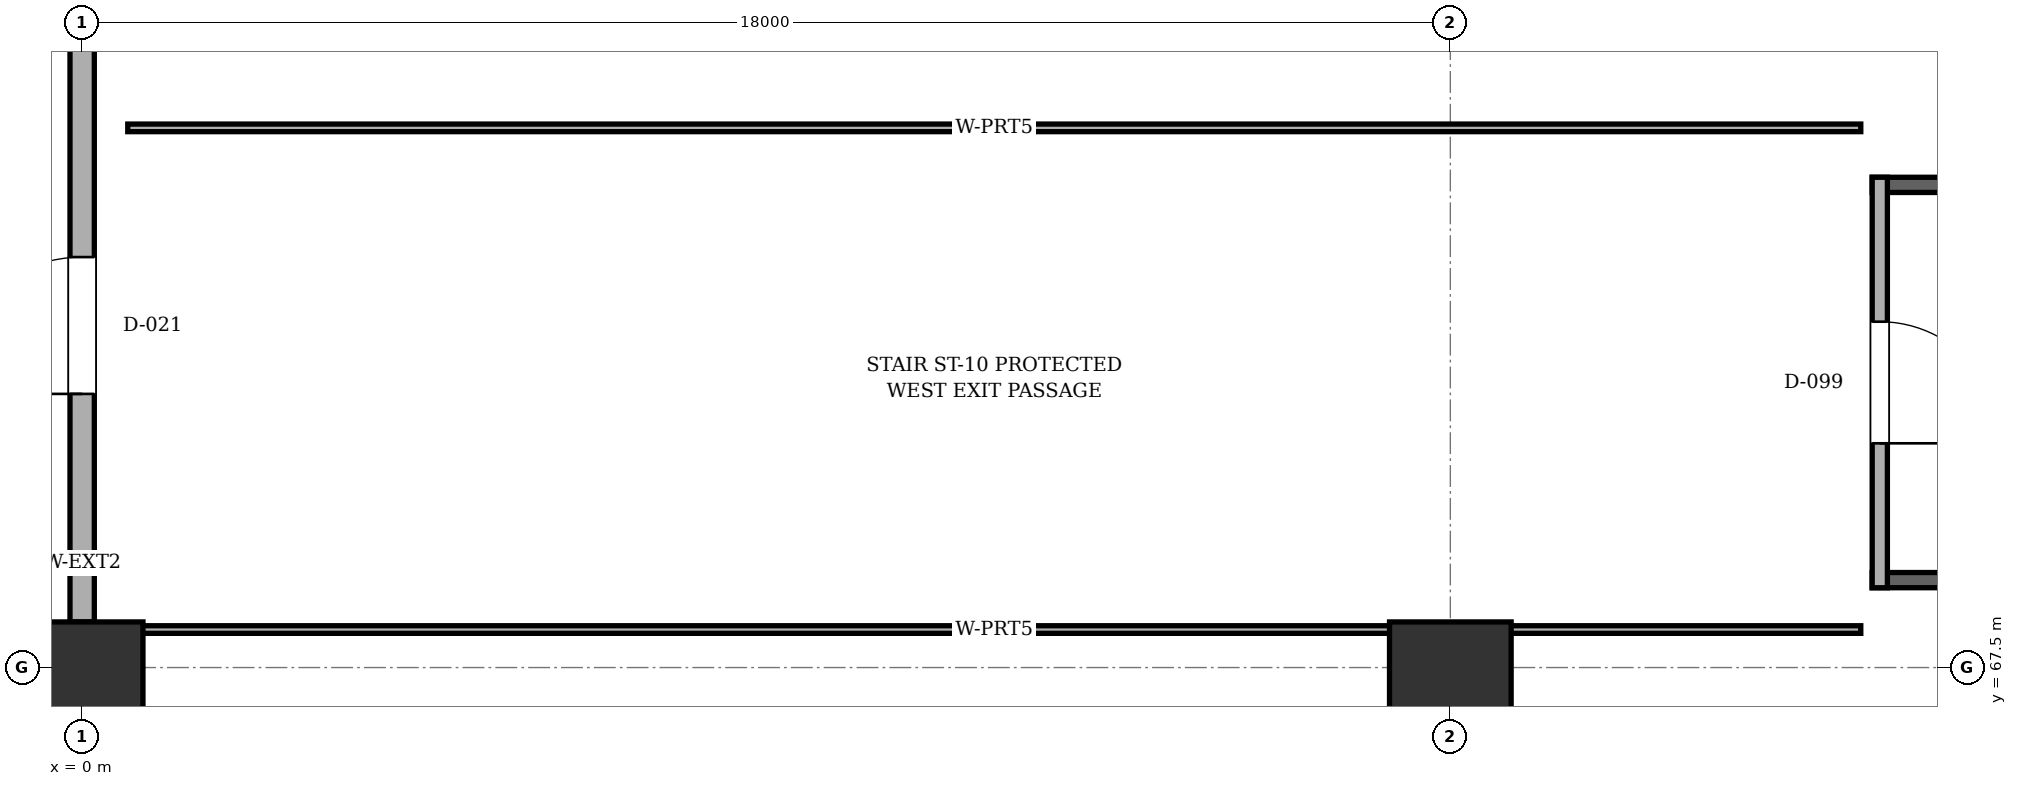
"""IFC4 building model, lengths in metres.
Left out: names, types, materials, properties, quantities, classifications, styles, units other than length and angle.
Written with IfcOpenShell. Run it as: python <this file> out.ifc"""

import sys

from ifc_helpers import new_model, si_unit, direction, frame, frame_2d, origin, origin_2d, place, context, subcontext, project, spatial, rectangle, extrude, element, fill, save


model = new_model("IFC4")
c1 = context("Model", 3, precision=1e-05, world=origin(), true_north=direction((0.0, 1.0)))
c2 = subcontext(c1, "Body", "Model", "MODEL_VIEW")
j1 = project(units=[si_unit("LENGTHUNIT", "METRE"), si_unit("PLANEANGLEUNIT", "RADIAN")], contexts=[c1])
p1 = place(None, origin())
s1 = spatial("IfcSite", under=j1, at=p1, CompositionType="ELEMENT")
p2 = place(p1, origin())
s2 = spatial("IfcBuilding", under=s1, at=p2, CompositionType="ELEMENT")
p3 = place(p2, origin())
s3 = spatial("IfcBuildingStorey", under=s2, at=p3, CompositionType="ELEMENT", Elevation=0.0)
for number, where, z_axis, x_axis in (
    (1, (0.0, 67.5, 0.0), (0.0, 0.0, 1.0), (1.0, 0.0, 0.0)),
    (2, (18.0, 67.5, 0.0), (0.0, 0.0, 1.0), (1.0, 0.0, 0.0)),
):
    element("IfcColumn", number, at=place(p3, frame(where, z_axis=z_axis, x_axis=x_axis)), inside=s3, PredefinedType="COLUMN", context=c2, shape_type="SweptSolid", body=[
        extrude(rectangle(XDim=1.6, YDim=1.2, at=origin_2d()), origin(), (0.0, 0.0, 1.0), 6.6),
    ])
p4 = place(p3, frame((0.0, 68.1, 0.0), z_axis=(0.0, 0.0, 1.0), x_axis=(0.0, 1.0, 0.0)))
e3 = element("IfcWall", 3, at=p4, inside=s3, PredefinedType="SOLIDWALL", context=c2, shape_type="SweptSolid", body=[
    extrude(rectangle(XDim=7.8, YDim=0.32, at=frame_2d((3.9, 0.0))), origin(), (0.0, 0.0, 1.0), 5.495),
])
p5 = place(p4, frame((3.0, 0.0, 0.0)))
e4 = element("IfcOpeningElement", 4, at=p5, cuts=e3, PredefinedType="OPENING", context=c2, shape_type="SweptSolid", body=[
    extrude(rectangle(XDim=1.8, YDim=2.35, at=frame_2d((0.9, 1.175))), frame((0.0, 0.17, 0.0), z_axis=(0.0, -1.0, 0.0), x_axis=(1.0, 0.0, 0.0)), (0.0, 0.0, 1.0), 0.34),
])
for number, where, z_axis, x_axis in (
    (5, (23.55, 68.65, 0.0), (0.0, 0.0, 1.0), (1.0, 0.0, 0.0)),
    (6, (35.125, 73.85, 0.0), (0.0, 0.0, 1.0), (-1.0, 0.0, 0.0)),
):
    element("IfcWall", number, at=place(p3, frame(where, z_axis=z_axis, x_axis=x_axis)), inside=s3, PredefinedType="SOLIDWALL", context=c2, shape_type="SweptSolid", body=[
        extrude(rectangle(XDim=11.575, YDim=0.2, at=frame_2d((5.788, 0.0))), origin(), (0.0, 0.0, 1.0), 6.32),
    ])
p6 = place(p3, frame((23.65, 73.95, 0.0), z_axis=(0.0, 0.0, 1.0), x_axis=(0.0, -1.0, 0.0)))
e7 = element("IfcWall", 7, at=p6, inside=s3, PredefinedType="SOLIDWALL", context=c2, shape_type="SweptSolid", body=[
    extrude(rectangle(XDim=5.4, YDim=0.2, at=frame_2d((2.7, 0.0))), origin(), (0.0, 0.0, 1.0), 4.4),
])
p7 = place(p6, frame((1.9, 0.0, 0.0)))
e8 = element("IfcOpeningElement", 8, at=p7, cuts=e7, PredefinedType="OPENING", context=c2, shape_type="SweptSolid", body=[
    extrude(rectangle(XDim=1.6, YDim=2.15, at=frame_2d((0.8, 1.075))), frame((0.0, 0.11, 0.0), z_axis=(0.0, -1.0, 0.0), x_axis=(1.0, 0.0, 0.0)), (0.0, 0.0, 1.0), 0.22),
])
for number, where, z_axis, x_axis in (
    (9, (23.4, 68.0, 0.0), (0.0, 0.0, 1.0), (-1.0, 0.0, 0.0)),
    (10, (0.6, 74.6, 0.0), (0.0, 0.0, 1.0), (1.0, 0.0, 0.0)),
):
    element("IfcWall", number, at=place(p3, frame(where, z_axis=z_axis, x_axis=x_axis)), inside=s3, PredefinedType="PARTITIONING", context=c2, shape_type="SweptSolid", body=[
        extrude(rectangle(XDim=22.8, YDim=0.1, at=frame_2d((11.4, 0.0))), origin(), (0.0, 0.0, 1.0), 4.4),
    ])
p8 = place(p5, origin())
e11 = element("IfcDoor", 11, at=p8, inside=s3, OperationType="SINGLE_SWING_LEFT", PredefinedType="DOOR", context=c2, shape_type="SweptSolid", body=[
    extrude(rectangle(XDim=1.8, YDim=2.35, at=frame_2d((0.9, 1.175))), frame((0.0, 0.025, 0.0), z_axis=(0.0, -1.0, 0.0), x_axis=(1.0, 0.0, 0.0)), (0.0, 0.0, 1.0), 0.05),
])
fill(e4, e11)
p9 = place(p7, origin())
e12 = element("IfcDoor", 12, at=p9, inside=s3, OperationType="SINGLE_SWING_RIGHT", PredefinedType="DOOR", context=c2, shape_type="SweptSolid", body=[
    extrude(rectangle(XDim=1.6, YDim=2.15, at=frame_2d((0.8, 1.075))), frame((0.0, 0.025, 0.0), z_axis=(0.0, -1.0, 0.0), x_axis=(1.0, 0.0, 0.0)), (0.0, 0.0, 1.0), 0.05),
])
fill(e8, e12)
save(model, sys.argv[1])
